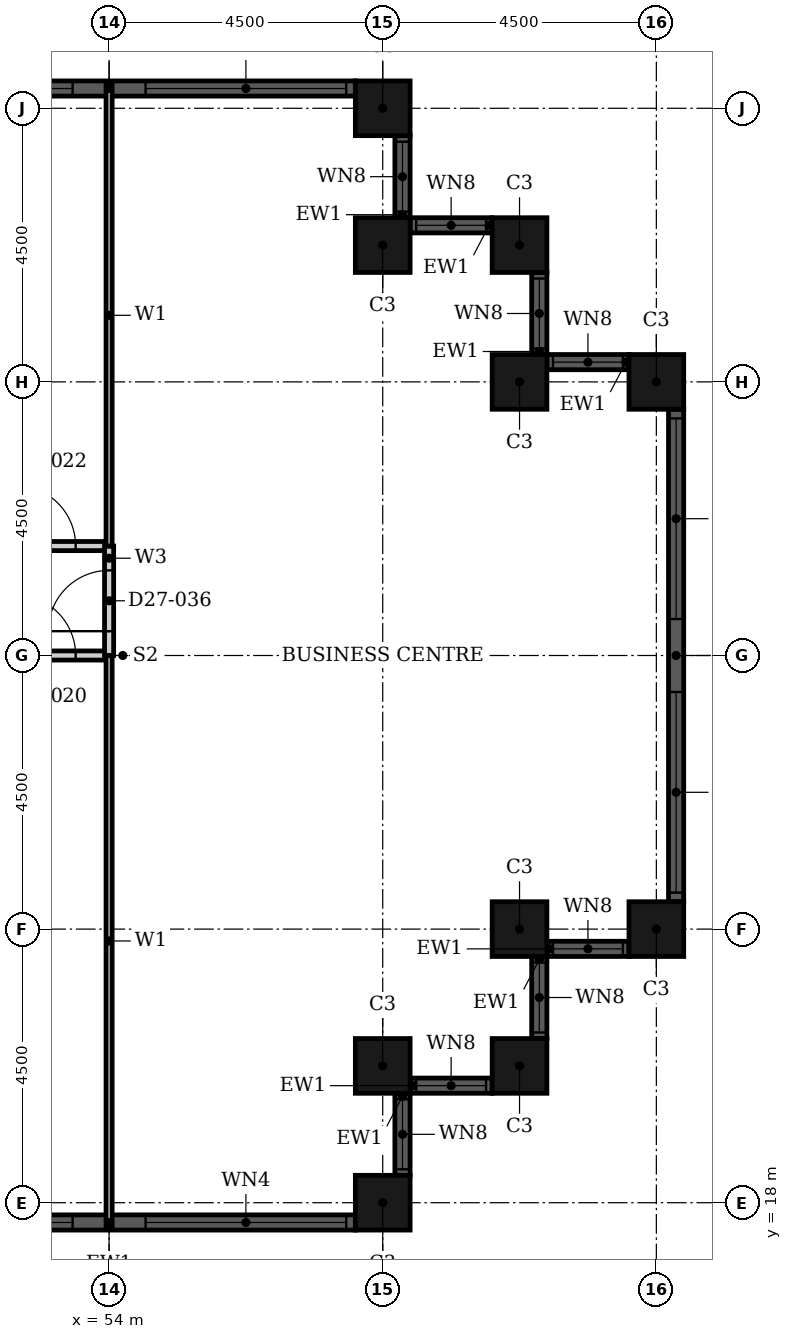
"""IFC4 building model, lengths in metres.
Left out: names, types, materials, properties, quantities, classifications, styles, units other than length and angle.
Written with IfcOpenShell. Run it as: python <this file> out.ifc"""

import sys

from ifc_helpers import new_model, si_unit, direction, frame, frame_2d, origin, origin_2d, place, context, subcontext, project, spatial, rectangle, hollow_rectangle, extrude, element, fill, save


model = new_model("IFC4")
c1 = context("Model", 3, precision=1e-05, world=origin(), true_north=direction((0.0, 1.0)))
c2 = subcontext(c1, "Body", "Model", "MODEL_VIEW")
j1 = project(units=[si_unit("LENGTHUNIT", "METRE"), si_unit("PLANEANGLEUNIT", "RADIAN")], contexts=[c1])
p1 = place(None, origin())
s1 = spatial("IfcSite", under=j1, at=p1, CompositionType="ELEMENT")
p2 = place(p1, origin())
s2 = spatial("IfcBuilding", under=s1, at=p2, CompositionType="ELEMENT")
p3 = place(p2, frame((0.0, 0.0, 111.6)))
s3 = spatial("IfcBuildingStorey", under=s2, at=p3, CompositionType="ELEMENT", Elevation=111.6)
for number, where, z_axis, x_axis in (
    (1, (58.5, 18.0, 0.0), (0.0, 0.0, 1.0), (1.0, 0.0, 0.0)),
    (2, (58.5, 20.25, 0.0), (0.0, 0.0, 1.0), (1.0, 0.0, 0.0)),
    (3, (60.75, 20.25, 0.0), (0.0, 0.0, 1.0), (1.0, 0.0, 0.0)),
    (4, (60.75, 22.5, 0.0), (0.0, 0.0, 1.0), (1.0, 0.0, 0.0)),
    (5, (63.0, 22.5, 0.0), (0.0, 0.0, 1.0), (1.0, 0.0, 0.0)),
    (6, (63.0, 31.5, 0.0), (0.0, 0.0, 1.0), (1.0, 0.0, 0.0)),
    (7, (60.75, 31.5, 0.0), (0.0, 0.0, 1.0), (1.0, 0.0, 0.0)),
    (8, (60.75, 33.75, 0.0), (0.0, 0.0, 1.0), (1.0, 0.0, 0.0)),
    (9, (58.5, 33.75, 0.0), (0.0, 0.0, 1.0), (1.0, 0.0, 0.0)),
    (10, (58.5, 36.0, 0.0), (0.0, 0.0, 1.0), (1.0, 0.0, 0.0)),
):
    element("IfcColumn", number, at=place(p3, frame(where, z_axis=z_axis, x_axis=x_axis)), inside=s3, PredefinedType="COLUMN", context=c2, shape_type="SweptSolid", body=[
        extrude(hollow_rectangle(XDim=0.9, YDim=0.9, WallThickness=0.028, at=origin_2d()), origin(), (0.0, 0.0, 1.0), 3.6),
    ])
p4 = place(p3, frame((49.95, 17.675, 0.0), z_axis=(0.0, 0.0, 1.0), x_axis=(1.0, 0.0, 0.0)))
e11 = element("IfcWall", 11, at=p4, inside=s3, PredefinedType="SOLIDWALL", context=c2, shape_type="SweptSolid", body=[
    extrude(rectangle(XDim=8.1, YDim=0.25, at=frame_2d((4.05, 0.0))), origin(), (0.0, 0.0, 1.0), 3.6),
])
p5 = place(p4, frame((0.15, 0.0, 0.9)))
e12 = element("IfcOpeningElement", 12, at=p5, cuts=e11, PredefinedType="OPENING", context=c2, shape_type="SweptSolid", body=[
    extrude(rectangle(XDim=3.3, YDim=2.08, at=frame_2d((1.65, 1.04))), frame((0.0, 0.135, 0.0), z_axis=(0.0, -1.0, 0.0), x_axis=(1.0, 0.0, 0.0)), (0.0, 0.0, 1.0), 0.27),
])
p6 = place(p4, frame((4.65, 0.0, 0.9)))
e13 = element("IfcOpeningElement", 13, at=p6, cuts=e11, PredefinedType="OPENING", context=c2, shape_type="SweptSolid", body=[
    extrude(rectangle(XDim=3.3, YDim=2.08, at=frame_2d((1.65, 1.04))), frame((0.0, 0.135, 0.0), z_axis=(0.0, -1.0, 0.0), x_axis=(1.0, 0.0, 0.0)), (0.0, 0.0, 1.0), 0.27),
])
p7 = place(p3, frame((58.825, 18.45, 0.0), z_axis=(0.0, 0.0, 1.0), x_axis=(0.0, 1.0, 0.0)))
e14 = element("IfcWall", 14, at=p7, inside=s3, PredefinedType="SOLIDWALL", context=c2, shape_type="SweptSolid", body=[
    extrude(rectangle(XDim=1.35, YDim=0.25, at=frame_2d((0.675, 0.0))), origin(), (0.0, 0.0, 1.0), 3.6),
])
p8 = place(p7, frame((0.1, 0.0, 0.9)))
e15 = element("IfcOpeningElement", 15, at=p8, cuts=e14, PredefinedType="OPENING", context=c2, shape_type="SweptSolid", body=[
    extrude(rectangle(XDim=1.15, YDim=2.08, at=frame_2d((0.575, 1.04))), frame((0.0, 0.135, 0.0), z_axis=(0.0, -1.0, 0.0), x_axis=(1.0, 0.0, 0.0)), (0.0, 0.0, 1.0), 0.27),
])
p9 = place(p3, frame((58.95, 19.925, 0.0), z_axis=(0.0, 0.0, 1.0), x_axis=(1.0, 0.0, 0.0)))
e16 = element("IfcWall", 16, at=p9, inside=s3, PredefinedType="SOLIDWALL", context=c2, shape_type="SweptSolid", body=[
    extrude(rectangle(XDim=1.35, YDim=0.25, at=frame_2d((0.675, 0.0))), origin(), (0.0, 0.0, 1.0), 3.6),
])
p10 = place(p9, frame((0.1, 0.0, 0.9)))
e17 = element("IfcOpeningElement", 17, at=p10, cuts=e16, PredefinedType="OPENING", context=c2, shape_type="SweptSolid", body=[
    extrude(rectangle(XDim=1.15, YDim=2.08, at=frame_2d((0.575, 1.04))), frame((0.0, 0.135, 0.0), z_axis=(0.0, -1.0, 0.0), x_axis=(1.0, 0.0, 0.0)), (0.0, 0.0, 1.0), 0.27),
])
p11 = place(p3, frame((61.075, 20.7, 0.0), z_axis=(0.0, 0.0, 1.0), x_axis=(0.0, 1.0, 0.0)))
e18 = element("IfcWall", 18, at=p11, inside=s3, PredefinedType="SOLIDWALL", context=c2, shape_type="SweptSolid", body=[
    extrude(rectangle(XDim=1.35, YDim=0.25, at=frame_2d((0.675, 0.0))), origin(), (0.0, 0.0, 1.0), 3.6),
])
p12 = place(p11, frame((0.1, 0.0, 0.9)))
e19 = element("IfcOpeningElement", 19, at=p12, cuts=e18, PredefinedType="OPENING", context=c2, shape_type="SweptSolid", body=[
    extrude(rectangle(XDim=1.15, YDim=2.08, at=frame_2d((0.575, 1.04))), frame((0.0, 0.135, 0.0), z_axis=(0.0, -1.0, 0.0), x_axis=(1.0, 0.0, 0.0)), (0.0, 0.0, 1.0), 0.27),
])
p13 = place(p3, frame((61.2, 22.175, 0.0), z_axis=(0.0, 0.0, 1.0), x_axis=(1.0, 0.0, 0.0)))
e20 = element("IfcWall", 20, at=p13, inside=s3, PredefinedType="SOLIDWALL", context=c2, shape_type="SweptSolid", body=[
    extrude(rectangle(XDim=1.35, YDim=0.25, at=frame_2d((0.675, 0.0))), origin(), (0.0, 0.0, 1.0), 3.6),
])
p14 = place(p13, frame((0.1, 0.0, 0.9)))
e21 = element("IfcOpeningElement", 21, at=p14, cuts=e20, PredefinedType="OPENING", context=c2, shape_type="SweptSolid", body=[
    extrude(rectangle(XDim=1.15, YDim=2.08, at=frame_2d((0.575, 1.04))), frame((0.0, 0.135, 0.0), z_axis=(0.0, -1.0, 0.0), x_axis=(1.0, 0.0, 0.0)), (0.0, 0.0, 1.0), 0.27),
])
p15 = place(p3, frame((63.325, 22.95, 0.0), z_axis=(0.0, 0.0, 1.0), x_axis=(0.0, 1.0, 0.0)))
e22 = element("IfcWall", 22, at=p15, inside=s3, PredefinedType="SOLIDWALL", context=c2, shape_type="SweptSolid", body=[
    extrude(rectangle(XDim=8.1, YDim=0.25, at=frame_2d((4.05, 0.0))), origin(), (0.0, 0.0, 1.0), 3.6),
])
p16 = place(p15, frame((0.15, 0.0, 0.9)))
e23 = element("IfcOpeningElement", 23, at=p16, cuts=e22, PredefinedType="OPENING", context=c2, shape_type="SweptSolid", body=[
    extrude(rectangle(XDim=3.3, YDim=2.08, at=frame_2d((1.65, 1.04))), frame((0.0, 0.135, 0.0), z_axis=(0.0, -1.0, 0.0), x_axis=(1.0, 0.0, 0.0)), (0.0, 0.0, 1.0), 0.27),
])
p17 = place(p15, frame((4.65, 0.0, 0.9)))
e24 = element("IfcOpeningElement", 24, at=p17, cuts=e22, PredefinedType="OPENING", context=c2, shape_type="SweptSolid", body=[
    extrude(rectangle(XDim=3.3, YDim=2.08, at=frame_2d((1.65, 1.04))), frame((0.0, 0.135, 0.0), z_axis=(0.0, -1.0, 0.0), x_axis=(1.0, 0.0, 0.0)), (0.0, 0.0, 1.0), 0.27),
])
p18 = place(p3, frame((62.55, 31.825, 0.0), z_axis=(0.0, 0.0, 1.0), x_axis=(-1.0, 0.0, 0.0)))
e25 = element("IfcWall", 25, at=p18, inside=s3, PredefinedType="SOLIDWALL", context=c2, shape_type="SweptSolid", body=[
    extrude(rectangle(XDim=1.35, YDim=0.25, at=frame_2d((0.675, 0.0))), origin(), (0.0, 0.0, 1.0), 3.6),
])
p19 = place(p18, frame((0.1, 0.0, 0.9)))
e26 = element("IfcOpeningElement", 26, at=p19, cuts=e25, PredefinedType="OPENING", context=c2, shape_type="SweptSolid", body=[
    extrude(rectangle(XDim=1.15, YDim=2.08, at=frame_2d((0.575, 1.04))), frame((0.0, 0.135, 0.0), z_axis=(0.0, -1.0, 0.0), x_axis=(1.0, 0.0, 0.0)), (0.0, 0.0, 1.0), 0.27),
])
p20 = place(p3, frame((61.075, 31.95, 0.0), z_axis=(0.0, 0.0, 1.0), x_axis=(0.0, 1.0, 0.0)))
e27 = element("IfcWall", 27, at=p20, inside=s3, PredefinedType="SOLIDWALL", context=c2, shape_type="SweptSolid", body=[
    extrude(rectangle(XDim=1.35, YDim=0.25, at=frame_2d((0.675, 0.0))), origin(), (0.0, 0.0, 1.0), 3.6),
])
p21 = place(p20, frame((0.1, 0.0, 0.9)))
e28 = element("IfcOpeningElement", 28, at=p21, cuts=e27, PredefinedType="OPENING", context=c2, shape_type="SweptSolid", body=[
    extrude(rectangle(XDim=1.15, YDim=2.08, at=frame_2d((0.575, 1.04))), frame((0.0, 0.135, 0.0), z_axis=(0.0, -1.0, 0.0), x_axis=(1.0, 0.0, 0.0)), (0.0, 0.0, 1.0), 0.27),
])
p22 = place(p3, frame((60.3, 34.075, 0.0), z_axis=(0.0, 0.0, 1.0), x_axis=(-1.0, 0.0, 0.0)))
e29 = element("IfcWall", 29, at=p22, inside=s3, PredefinedType="SOLIDWALL", context=c2, shape_type="SweptSolid", body=[
    extrude(rectangle(XDim=1.35, YDim=0.25, at=frame_2d((0.675, 0.0))), origin(), (0.0, 0.0, 1.0), 3.6),
])
p23 = place(p22, frame((0.1, 0.0, 0.9)))
e30 = element("IfcOpeningElement", 30, at=p23, cuts=e29, PredefinedType="OPENING", context=c2, shape_type="SweptSolid", body=[
    extrude(rectangle(XDim=1.15, YDim=2.08, at=frame_2d((0.575, 1.04))), frame((0.0, 0.135, 0.0), z_axis=(0.0, -1.0, 0.0), x_axis=(1.0, 0.0, 0.0)), (0.0, 0.0, 1.0), 0.27),
])
p24 = place(p3, frame((58.825, 34.2, 0.0), z_axis=(0.0, 0.0, 1.0), x_axis=(0.0, 1.0, 0.0)))
e31 = element("IfcWall", 31, at=p24, inside=s3, PredefinedType="SOLIDWALL", context=c2, shape_type="SweptSolid", body=[
    extrude(rectangle(XDim=1.35, YDim=0.25, at=frame_2d((0.675, 0.0))), origin(), (0.0, 0.0, 1.0), 3.6),
])
p25 = place(p24, frame((0.1, 0.0, 0.9)))
e32 = element("IfcOpeningElement", 32, at=p25, cuts=e31, PredefinedType="OPENING", context=c2, shape_type="SweptSolid", body=[
    extrude(rectangle(XDim=1.15, YDim=2.08, at=frame_2d((0.575, 1.04))), frame((0.0, 0.135, 0.0), z_axis=(0.0, -1.0, 0.0), x_axis=(1.0, 0.0, 0.0)), (0.0, 0.0, 1.0), 0.27),
])
p26 = place(p3, frame((58.05, 36.325, 0.0), z_axis=(0.0, 0.0, 1.0), x_axis=(-1.0, 0.0, 0.0)))
e33 = element("IfcWall", 33, at=p26, inside=s3, PredefinedType="SOLIDWALL", context=c2, shape_type="SweptSolid", body=[
    extrude(rectangle(XDim=8.1, YDim=0.25, at=frame_2d((4.05, 0.0))), origin(), (0.0, 0.0, 1.0), 3.6),
])
p27 = place(p26, frame((0.15, 0.0, 0.9)))
e34 = element("IfcOpeningElement", 34, at=p27, cuts=e33, PredefinedType="OPENING", context=c2, shape_type="SweptSolid", body=[
    extrude(rectangle(XDim=3.3, YDim=2.08, at=frame_2d((1.65, 1.04))), frame((0.0, 0.135, 0.0), z_axis=(0.0, -1.0, 0.0), x_axis=(1.0, 0.0, 0.0)), (0.0, 0.0, 1.0), 0.27),
])
p28 = place(p26, frame((4.65, 0.0, 0.9)))
e35 = element("IfcOpeningElement", 35, at=p28, cuts=e33, PredefinedType="OPENING", context=c2, shape_type="SweptSolid", body=[
    extrude(rectangle(XDim=3.3, YDim=2.08, at=frame_2d((1.65, 1.04))), frame((0.0, 0.135, 0.0), z_axis=(0.0, -1.0, 0.0), x_axis=(1.0, 0.0, 0.0)), (0.0, 0.0, 1.0), 0.27),
])
p29 = place(p3, frame((46.8, 27.0, 0.0), z_axis=(0.0, 0.0, 1.0), x_axis=(1.0, 0.0, 0.0)))
e36 = element("IfcWall", 36, at=p29, inside=s3, PredefinedType="PARTITIONING", context=c2, shape_type="SweptSolid", body=[
    extrude(rectangle(XDim=7.2, YDim=0.15, at=frame_2d((3.6, 0.0))), origin(), (0.0, 0.0, 1.0), 2.58),
])
p30 = place(p29, frame((5.65, 0.0, 0.0)))
e37 = element("IfcOpeningElement", 37, at=p30, cuts=e36, PredefinedType="OPENING", context=c2, shape_type="SweptSolid", body=[
    extrude(rectangle(XDim=1.0, YDim=2.1, at=frame_2d((0.5, 1.05))), frame((0.0, 0.085, 0.0), z_axis=(0.0, -1.0, 0.0), x_axis=(1.0, 0.0, 0.0)), (0.0, 0.0, 1.0), 0.17),
])
p31 = place(p3, frame((46.8, 28.8, 0.0), z_axis=(0.0, 0.0, 1.0), x_axis=(1.0, 0.0, 0.0)))
e38 = element("IfcWall", 38, at=p31, inside=s3, PredefinedType="PARTITIONING", context=c2, shape_type="SweptSolid", body=[
    extrude(rectangle(XDim=7.2, YDim=0.15, at=frame_2d((3.6, 0.0))), origin(), (0.0, 0.0, 1.0), 3.3),
])
p32 = place(p31, frame((5.65, 0.0, 0.0)))
e39 = element("IfcOpeningElement", 39, at=p32, cuts=e38, PredefinedType="OPENING", context=c2, shape_type="SweptSolid", body=[
    extrude(rectangle(XDim=1.0, YDim=2.1, at=frame_2d((0.5, 1.05))), frame((0.0, 0.085, 0.0), z_axis=(0.0, -1.0, 0.0), x_axis=(1.0, 0.0, 0.0)), (0.0, 0.0, 1.0), 0.17),
])
p33 = place(p3, frame((54.0, 27.0, 0.0), z_axis=(0.0, 0.0, 1.0), x_axis=(0.0, 1.0, 0.0)))
e40 = element("IfcWall", 40, at=p33, inside=s3, PredefinedType="PARTITIONING", context=c2, shape_type="SweptSolid", body=[
    extrude(rectangle(XDim=1.8, YDim=0.15, at=frame_2d((0.9, 0.0))), origin(), (0.0, 0.0, 1.0), 3.3),
])
p34 = place(p33, frame((0.4, 0.0, 0.0)))
e41 = element("IfcOpeningElement", 41, at=p34, cuts=e40, PredefinedType="OPENING", context=c2, shape_type="SweptSolid", body=[
    extrude(rectangle(XDim=1.0, YDim=2.1, at=frame_2d((0.5, 1.05))), frame((0.0, 0.085, 0.0), z_axis=(0.0, -1.0, 0.0), x_axis=(1.0, 0.0, 0.0)), (0.0, 0.0, 1.0), 0.17),
])
p35 = place(p3, frame((54.0, 28.8, 0.0), z_axis=(0.0, 0.0, 1.0), x_axis=(0.0, 1.0, 0.0)))
e42 = element("IfcWall", 42, at=p35, inside=s3, PredefinedType="PARTITIONING", context=c2, shape_type="SweptSolid", body=[
    extrude(rectangle(XDim=7.59, YDim=0.1, at=frame_2d((3.795, 0.0))), origin(), (0.0, 0.0, 1.0), 3.3),
])
p36 = place(p3, frame((54.0, 17.61, 0.0), z_axis=(0.0, 0.0, 1.0), x_axis=(0.0, 1.0, 0.0)))
e43 = element("IfcWall", 43, at=p36, inside=s3, PredefinedType="PARTITIONING", context=c2, shape_type="SweptSolid", body=[
    extrude(rectangle(XDim=9.39, YDim=0.1, at=frame_2d((4.695, 0.0))), origin(), (0.0, 0.0, 1.0), 3.3),
])
p37 = place(p5, origin())
e44 = element("IfcWindow", 44, at=p37, inside=s3, PartitioningType="SINGLE_PANEL", PredefinedType="WINDOW", context=c2, shape_type="SweptSolid", body=[
    extrude(rectangle(XDim=3.3, YDim=2.08, at=frame_2d((1.65, 1.04))), frame((0.0, 0.03, 0.0), z_axis=(0.0, -1.0, 0.0), x_axis=(1.0, 0.0, 0.0)), (0.0, 0.0, 1.0), 0.06),
])
fill(e12, e44)
p38 = place(p6, origin())
e45 = element("IfcWindow", 45, at=p38, inside=s3, PartitioningType="SINGLE_PANEL", PredefinedType="WINDOW", context=c2, shape_type="SweptSolid", body=[
    extrude(rectangle(XDim=3.3, YDim=2.08, at=frame_2d((1.65, 1.04))), frame((0.0, 0.03, 0.0), z_axis=(0.0, -1.0, 0.0), x_axis=(1.0, 0.0, 0.0)), (0.0, 0.0, 1.0), 0.06),
])
fill(e13, e45)
p39 = place(p8, origin())
e46 = element("IfcWindow", 46, at=p39, inside=s3, PartitioningType="SINGLE_PANEL", PredefinedType="WINDOW", context=c2, shape_type="SweptSolid", body=[
    extrude(rectangle(XDim=1.15, YDim=2.08, at=frame_2d((0.575, 1.04))), frame((0.0, 0.03, 0.0), z_axis=(0.0, -1.0, 0.0), x_axis=(1.0, 0.0, 0.0)), (0.0, 0.0, 1.0), 0.06),
])
fill(e15, e46)
p40 = place(p10, origin())
e47 = element("IfcWindow", 47, at=p40, inside=s3, PartitioningType="SINGLE_PANEL", PredefinedType="WINDOW", context=c2, shape_type="SweptSolid", body=[
    extrude(rectangle(XDim=1.15, YDim=2.08, at=frame_2d((0.575, 1.04))), frame((0.0, 0.03, 0.0), z_axis=(0.0, -1.0, 0.0), x_axis=(1.0, 0.0, 0.0)), (0.0, 0.0, 1.0), 0.06),
])
fill(e17, e47)
p41 = place(p12, origin())
e48 = element("IfcWindow", 48, at=p41, inside=s3, PartitioningType="SINGLE_PANEL", PredefinedType="WINDOW", context=c2, shape_type="SweptSolid", body=[
    extrude(rectangle(XDim=1.15, YDim=2.08, at=frame_2d((0.575, 1.04))), frame((0.0, 0.03, 0.0), z_axis=(0.0, -1.0, 0.0), x_axis=(1.0, 0.0, 0.0)), (0.0, 0.0, 1.0), 0.06),
])
fill(e19, e48)
p42 = place(p14, origin())
e49 = element("IfcWindow", 49, at=p42, inside=s3, PartitioningType="SINGLE_PANEL", PredefinedType="WINDOW", context=c2, shape_type="SweptSolid", body=[
    extrude(rectangle(XDim=1.15, YDim=2.08, at=frame_2d((0.575, 1.04))), frame((0.0, 0.03, 0.0), z_axis=(0.0, -1.0, 0.0), x_axis=(1.0, 0.0, 0.0)), (0.0, 0.0, 1.0), 0.06),
])
fill(e21, e49)
p43 = place(p16, origin())
e50 = element("IfcWindow", 50, at=p43, inside=s3, PartitioningType="SINGLE_PANEL", PredefinedType="WINDOW", context=c2, shape_type="SweptSolid", body=[
    extrude(rectangle(XDim=3.3, YDim=2.08, at=frame_2d((1.65, 1.04))), frame((0.0, 0.03, 0.0), z_axis=(0.0, -1.0, 0.0), x_axis=(1.0, 0.0, 0.0)), (0.0, 0.0, 1.0), 0.06),
])
fill(e23, e50)
p44 = place(p17, origin())
e51 = element("IfcWindow", 51, at=p44, inside=s3, PartitioningType="SINGLE_PANEL", PredefinedType="WINDOW", context=c2, shape_type="SweptSolid", body=[
    extrude(rectangle(XDim=3.3, YDim=2.08, at=frame_2d((1.65, 1.04))), frame((0.0, 0.03, 0.0), z_axis=(0.0, -1.0, 0.0), x_axis=(1.0, 0.0, 0.0)), (0.0, 0.0, 1.0), 0.06),
])
fill(e24, e51)
p45 = place(p19, origin())
e52 = element("IfcWindow", 52, at=p45, inside=s3, PartitioningType="SINGLE_PANEL", PredefinedType="WINDOW", context=c2, shape_type="SweptSolid", body=[
    extrude(rectangle(XDim=1.15, YDim=2.08, at=frame_2d((0.575, 1.04))), frame((0.0, 0.03, 0.0), z_axis=(0.0, -1.0, 0.0), x_axis=(1.0, 0.0, 0.0)), (0.0, 0.0, 1.0), 0.06),
])
fill(e26, e52)
p46 = place(p21, origin())
e53 = element("IfcWindow", 53, at=p46, inside=s3, PartitioningType="SINGLE_PANEL", PredefinedType="WINDOW", context=c2, shape_type="SweptSolid", body=[
    extrude(rectangle(XDim=1.15, YDim=2.08, at=frame_2d((0.575, 1.04))), frame((0.0, 0.03, 0.0), z_axis=(0.0, -1.0, 0.0), x_axis=(1.0, 0.0, 0.0)), (0.0, 0.0, 1.0), 0.06),
])
fill(e28, e53)
p47 = place(p23, origin())
e54 = element("IfcWindow", 54, at=p47, inside=s3, PartitioningType="SINGLE_PANEL", PredefinedType="WINDOW", context=c2, shape_type="SweptSolid", body=[
    extrude(rectangle(XDim=1.15, YDim=2.08, at=frame_2d((0.575, 1.04))), frame((0.0, 0.03, 0.0), z_axis=(0.0, -1.0, 0.0), x_axis=(1.0, 0.0, 0.0)), (0.0, 0.0, 1.0), 0.06),
])
fill(e30, e54)
p48 = place(p25, origin())
e55 = element("IfcWindow", 55, at=p48, inside=s3, PartitioningType="SINGLE_PANEL", PredefinedType="WINDOW", context=c2, shape_type="SweptSolid", body=[
    extrude(rectangle(XDim=1.15, YDim=2.08, at=frame_2d((0.575, 1.04))), frame((0.0, 0.03, 0.0), z_axis=(0.0, -1.0, 0.0), x_axis=(1.0, 0.0, 0.0)), (0.0, 0.0, 1.0), 0.06),
])
fill(e32, e55)
p49 = place(p27, origin())
e56 = element("IfcWindow", 56, at=p49, inside=s3, PartitioningType="SINGLE_PANEL", PredefinedType="WINDOW", context=c2, shape_type="SweptSolid", body=[
    extrude(rectangle(XDim=3.3, YDim=2.08, at=frame_2d((1.65, 1.04))), frame((0.0, 0.03, 0.0), z_axis=(0.0, -1.0, 0.0), x_axis=(1.0, 0.0, 0.0)), (0.0, 0.0, 1.0), 0.06),
])
fill(e34, e56)
p50 = place(p28, origin())
e57 = element("IfcWindow", 57, at=p50, inside=s3, PartitioningType="SINGLE_PANEL", PredefinedType="WINDOW", context=c2, shape_type="SweptSolid", body=[
    extrude(rectangle(XDim=3.3, YDim=2.08, at=frame_2d((1.65, 1.04))), frame((0.0, 0.03, 0.0), z_axis=(0.0, -1.0, 0.0), x_axis=(1.0, 0.0, 0.0)), (0.0, 0.0, 1.0), 0.06),
])
fill(e35, e57)
p51 = place(p30, origin())
e58 = element("IfcDoor", 58, at=p51, inside=s3, OperationType="SINGLE_SWING_RIGHT", PredefinedType="DOOR", context=c2, shape_type="SweptSolid", body=[
    extrude(rectangle(XDim=1.0, YDim=2.1, at=frame_2d((0.5, 1.05))), frame((0.0, 0.025, 0.0), z_axis=(0.0, -1.0, 0.0), x_axis=(1.0, 0.0, 0.0)), (0.0, 0.0, 1.0), 0.05),
])
fill(e37, e58)
p52 = place(p32, origin())
e59 = element("IfcDoor", 59, at=p52, inside=s3, OperationType="SINGLE_SWING_RIGHT", PredefinedType="DOOR", context=c2, shape_type="SweptSolid", body=[
    extrude(rectangle(XDim=1.0, YDim=2.1, at=frame_2d((0.5, 1.05))), frame((0.0, 0.025, 0.0), z_axis=(0.0, -1.0, 0.0), x_axis=(1.0, 0.0, 0.0)), (0.0, 0.0, 1.0), 0.05),
])
fill(e39, e59)
p53 = place(p34, origin())
e60 = element("IfcDoor", 60, at=p53, inside=s3, OperationType="SINGLE_SWING_LEFT", PredefinedType="DOOR", context=c2, shape_type="SweptSolid", body=[
    extrude(rectangle(XDim=1.0, YDim=2.1, at=frame_2d((0.5, 1.05))), frame((0.0, 0.025, 0.0), z_axis=(0.0, -1.0, 0.0), x_axis=(1.0, 0.0, 0.0)), (0.0, 0.0, 1.0), 0.05),
])
fill(e41, e60)
save(model, sys.argv[1])
